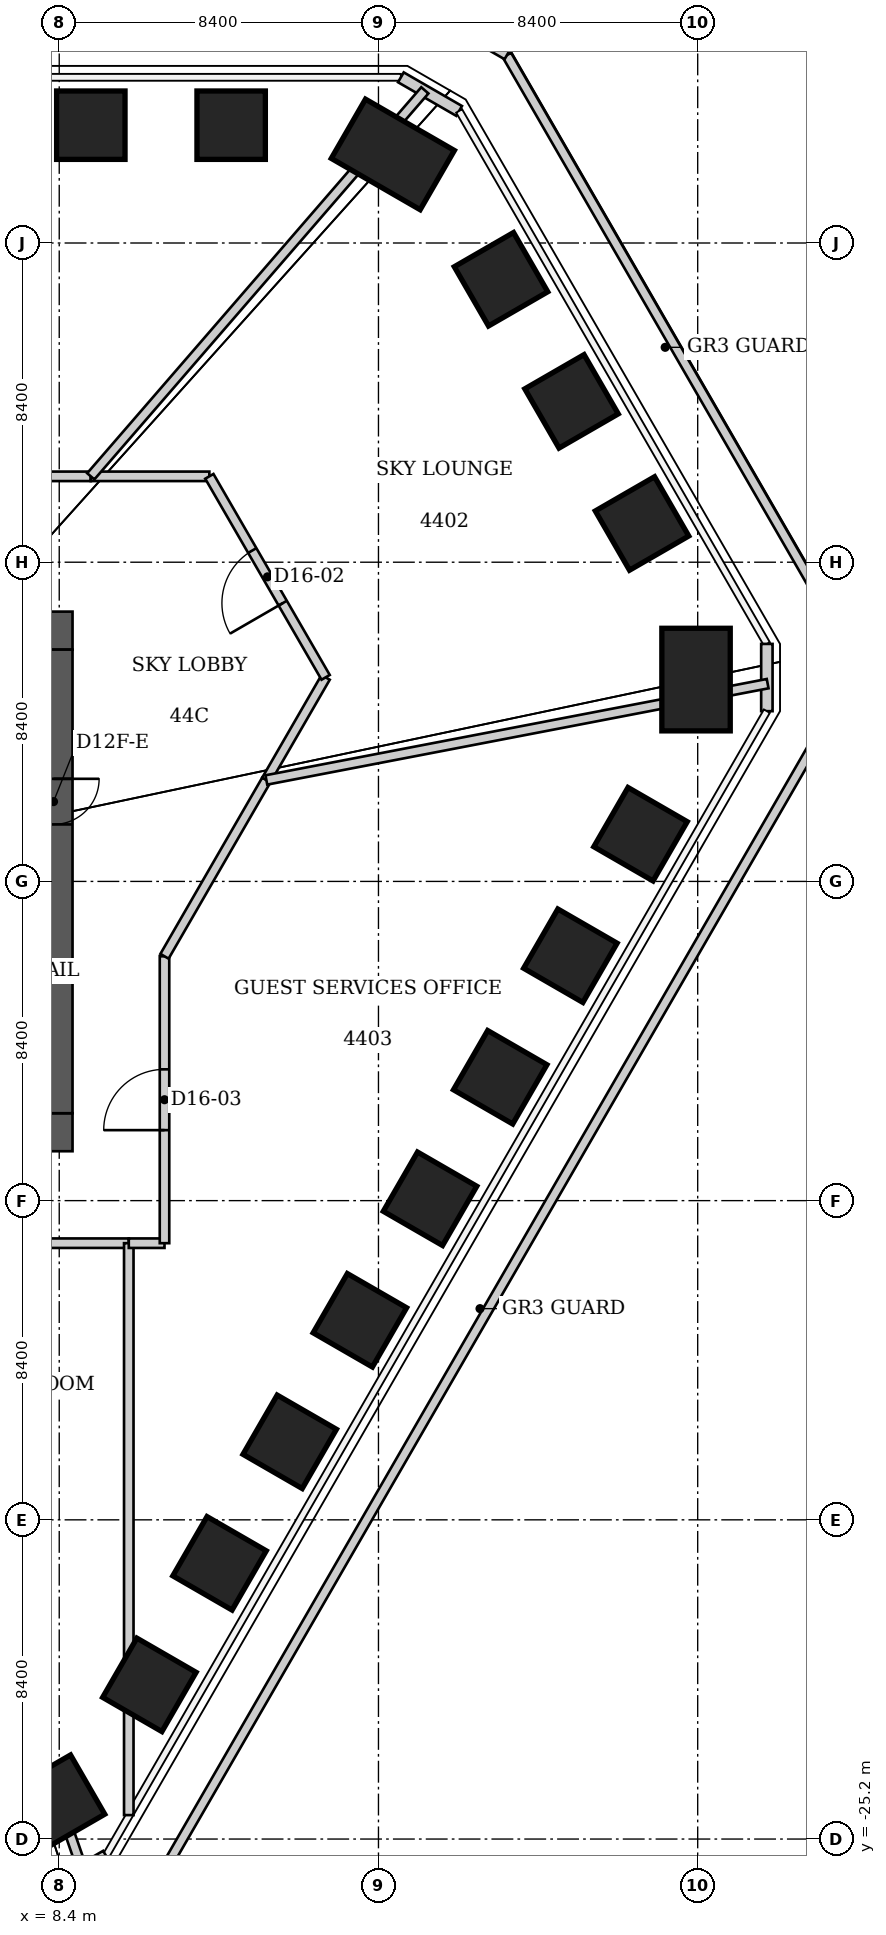
"""IFC4 building model, lengths in metres.
Left out: names, types, materials, properties, quantities, classifications, styles, units other than length and angle.
Written with IfcOpenShell. Run it as: python <this file> out.ifc"""

import sys

from ifc_helpers import new_model, si_unit, direction, frame, frame_2d, origin, origin_2d, place, context, subcontext, project, spatial, rectangle, extrude, clip, halfspace, element, fill, save


model = new_model("IFC4")
c1 = context("Model", 3, precision=1e-05, world=origin(), true_north=direction((0.0, 1.0)))
c2 = subcontext(c1, "Body", "Model", "MODEL_VIEW")
j1 = project(units=[si_unit("LENGTHUNIT", "METRE"), si_unit("PLANEANGLEUNIT", "RADIAN")], contexts=[c1])
p1 = place(None, origin())
s1 = spatial("IfcSite", under=j1, at=p1, CompositionType="ELEMENT")
p2 = place(p1, origin())
s2 = spatial("IfcBuilding", under=s1, at=p2, CompositionType="ELEMENT")
p3 = place(p2, frame((0.0, 0.0, 178.2)))
s3 = spatial("IfcBuildingStorey", under=s2, at=p3, CompositionType="ELEMENT", Elevation=178.2)
p4 = place(p3, frame((9.231, 19.9, -0.062), z_axis=(0.0, 0.0, 1.0), x_axis=(0.0, 1.0, 0.0)))
e1 = element("IfcColumn", 1, at=p4, inside=s3, PredefinedType="COLUMN", context=c2, shape_type="SweptSolid", body=[
    clip(extrude(rectangle(XDim=1.8, YDim=1.8, at=origin_2d()), origin(), (0.0, 0.0, 1.0), 5.062), halfspace(frame((0.0, 0.0, 0.062)), True)),
])
p5 = place(p3, frame((12.924, 19.9, -0.07), z_axis=(0.0, 0.0, 1.0), x_axis=(0.0, 1.0, 0.0)))
e2 = element("IfcColumn", 2, at=p5, inside=s3, PredefinedType="COLUMN", context=c2, shape_type="SweptSolid", body=[
    clip(extrude(rectangle(XDim=1.8, YDim=1.8, at=origin_2d()), origin(), (0.0, 0.0, 1.0), 5.07), halfspace(frame((0.0, 0.0, 0.07)), True)),
])
p6 = place(p3, frame((17.178, 19.131, -0.071), z_axis=(0.0, 0.0, 1.0), x_axis=(0.5, 0.866025403784, 0.0)))
e3 = element("IfcColumn", 3, at=p6, inside=s3, PredefinedType="COLUMN", context=c2, shape_type="SweptSolid", body=[
    clip(extrude(rectangle(XDim=1.8, YDim=2.7, at=origin_2d()), origin(), (0.0, 0.0, 1.0), 5.071), halfspace(frame((0.0, 0.0, 0.071)), True)),
])
p7 = place(p3, frame((20.025, 15.846, -0.061), z_axis=(0.0, 0.0, 1.0), x_axis=(0.866025403784, 0.5, 0.0)))
e4 = element("IfcColumn", 4, at=p7, inside=s3, PredefinedType="COLUMN", context=c2, shape_type="SweptSolid", body=[
    clip(extrude(rectangle(XDim=1.8, YDim=1.8, at=origin_2d()), origin(), (0.0, 0.0, 1.0), 5.061), halfspace(frame((0.0, 0.0, 0.061)), True)),
])
p8 = place(p3, frame((21.88, 12.633, -0.053), z_axis=(0.0, 0.0, 1.0), x_axis=(0.866025403784, 0.5, 0.0)))
e5 = element("IfcColumn", 5, at=p8, inside=s3, PredefinedType="COLUMN", context=c2, shape_type="SweptSolid", body=[
    clip(extrude(rectangle(XDim=1.8, YDim=1.8, at=origin_2d()), origin(), (0.0, 0.0, 1.0), 5.053), halfspace(frame((0.0, 0.0, 0.053)), True)),
])
p9 = place(p3, frame((23.735, 9.419, -0.061), z_axis=(0.0, 0.0, 1.0), x_axis=(0.866025403784, 0.5, 0.0)))
e6 = element("IfcColumn", 6, at=p9, inside=s3, PredefinedType="COLUMN", context=c2, shape_type="SweptSolid", body=[
    clip(extrude(rectangle(XDim=1.8, YDim=1.8, at=origin_2d()), origin(), (0.0, 0.0, 1.0), 5.061), halfspace(frame((0.0, 0.0, 0.061)), True)),
])
p10 = place(p3, frame((25.156, 5.311, -0.071), z_axis=(0.0, 0.0, 1.0), x_axis=(1.0, 0.0, 0.0)))
e7 = element("IfcColumn", 7, at=p10, inside=s3, PredefinedType="COLUMN", context=c2, shape_type="SweptSolid", body=[
    clip(extrude(rectangle(XDim=1.8, YDim=2.7, at=origin_2d()), origin(), (0.0, 0.0, 1.0), 5.071), halfspace(frame((0.0, 0.0, 0.071)), True)),
])
p11 = place(p3, frame((23.696, 1.242, -0.07), z_axis=(0.0, 0.0, 1.0), x_axis=(0.866025403784, -0.5, 0.0)))
e8 = element("IfcColumn", 8, at=p11, inside=s3, PredefinedType="COLUMN", context=c2, shape_type="SweptSolid", body=[
    clip(extrude(rectangle(XDim=1.8, YDim=1.8, at=origin_2d()), origin(), (0.0, 0.0, 1.0), 5.07), halfspace(frame((0.0, 0.0, 0.07)), True)),
])
p12 = place(p3, frame((21.85, -1.956, -0.062), z_axis=(0.0, 0.0, 1.0), x_axis=(0.866025403784, -0.5, 0.0)))
e9 = element("IfcColumn", 9, at=p12, inside=s3, PredefinedType="COLUMN", context=c2, shape_type="SweptSolid", body=[
    clip(extrude(rectangle(XDim=1.8, YDim=1.8, at=origin_2d()), origin(), (0.0, 0.0, 1.0), 5.062), halfspace(frame((0.0, 0.0, 0.062)), True)),
])
p13 = place(p3, frame((20.003, -5.153, -0.054), z_axis=(0.0, 0.0, 1.0), x_axis=(0.866025403784, -0.5, 0.0)))
e10 = element("IfcColumn", 10, at=p13, inside=s3, PredefinedType="COLUMN", context=c2, shape_type="SweptSolid", body=[
    clip(extrude(rectangle(XDim=1.8, YDim=1.8, at=origin_2d()), origin(), (0.0, 0.0, 1.0), 5.054), halfspace(frame((0.0, 0.0, 0.054)), True)),
])
for number, where, z_axis, x_axis in (
    (11, (18.157, -8.351, -0.046), (0.0, 0.0, 1.0), (0.866, -0.5, 0.0)),
    (12, (16.311, -11.549, -0.046), (0.0, 0.0, 1.0), (0.866, -0.5, 0.0)),
):
    element("IfcColumn", number, at=place(p3, frame(where, z_axis=z_axis, x_axis=x_axis)), inside=s3, PredefinedType="COLUMN", context=c2, shape_type="SweptSolid", body=[
        clip(extrude(rectangle(XDim=1.8, YDim=1.8, at=origin_2d()), origin(), (0.0, 0.0, 1.0), 5.046), halfspace(frame((0.0, 0.0, 0.046)), True)),
    ])
p14 = place(p3, frame((14.465, -14.747, -0.054), z_axis=(0.0, 0.0, 1.0), x_axis=(0.866025403784, -0.5, 0.0)))
e13 = element("IfcColumn", 13, at=p14, inside=s3, PredefinedType="COLUMN", context=c2, shape_type="SweptSolid", body=[
    clip(extrude(rectangle(XDim=1.8, YDim=1.8, at=origin_2d()), origin(), (0.0, 0.0, 1.0), 5.054), halfspace(frame((0.0, 0.0, 0.054)), True)),
])
p15 = place(p3, frame((12.618, -17.945, -0.062), z_axis=(0.0, 0.0, 1.0), x_axis=(0.866025403784, -0.5, 0.0)))
e14 = element("IfcColumn", 14, at=p15, inside=s3, PredefinedType="COLUMN", context=c2, shape_type="SweptSolid", body=[
    clip(extrude(rectangle(XDim=1.8, YDim=1.8, at=origin_2d()), origin(), (0.0, 0.0, 1.0), 5.062), halfspace(frame((0.0, 0.0, 0.062)), True)),
])
p16 = place(p3, frame((10.772, -21.142, -0.07), z_axis=(0.0, 0.0, 1.0), x_axis=(0.866025403784, -0.5, 0.0)))
e15 = element("IfcColumn", 15, at=p16, inside=s3, PredefinedType="COLUMN", context=c2, shape_type="SweptSolid", body=[
    clip(extrude(rectangle(XDim=1.8, YDim=1.8, at=origin_2d()), origin(), (0.0, 0.0, 1.0), 5.07), halfspace(frame((0.0, 0.0, 0.07)), True)),
])
p17 = place(p3, frame((7.979, -24.442, -0.071), z_axis=(0.0, 0.0, 1.0), x_axis=(0.5, -0.866025403784, 0.0)))
e16 = element("IfcColumn", 16, at=p17, inside=s3, PredefinedType="COLUMN", context=c2, shape_type="SweptSolid", body=[
    clip(extrude(rectangle(XDim=1.8, YDim=2.7, at=origin_2d()), origin(), (0.0, 0.0, 1.0), 5.071), halfspace(frame((0.0, 0.0, 0.071)), True)),
])
p18 = place(p3, frame((-8.75, 6.6, 0.0), z_axis=(0.0, 0.0, 1.0), x_axis=(1.0, 0.0, 0.0)))
e17 = element("IfcWall", 17, at=p18, inside=s3, PredefinedType="SHEAR", context=c2, shape_type="SweptSolid", body=[
    extrude(rectangle(XDim=17.5, YDim=1.0, at=frame_2d((8.75, 0.0))), origin(), (0.0, 0.0, 1.0), 5.0),
])
p19 = place(p18, frame((1.637, 0.0, 0.0)))
e18 = element("IfcOpeningElement", 18, at=p19, cuts=e17, PredefinedType="OPENING", context=c2, shape_type="SweptSolid", body=[
    extrude(rectangle(XDim=1.1, YDim=2.1, at=frame_2d((0.55, 1.05))), frame((0.0, 0.5, 0.0), z_axis=(0.0, -1.0, 0.0), x_axis=(1.0, 0.0, 0.0)), (0.0, 0.0, 1.0), 1.0),
])
p20 = place(p18, frame((4.262, 0.0, 0.0)))
e19 = element("IfcOpeningElement", 19, at=p20, cuts=e17, PredefinedType="OPENING", context=c2, shape_type="SweptSolid", body=[
    extrude(rectangle(XDim=1.1, YDim=2.1, at=frame_2d((0.55, 1.05))), frame((0.0, 0.5, 0.0), z_axis=(0.0, -1.0, 0.0), x_axis=(1.0, 0.0, 0.0)), (0.0, 0.0, 1.0), 1.0),
])
p21 = place(p18, frame((6.887, 0.0, 0.0)))
e20 = element("IfcOpeningElement", 20, at=p21, cuts=e17, PredefinedType="OPENING", context=c2, shape_type="SweptSolid", body=[
    extrude(rectangle(XDim=1.1, YDim=2.1, at=frame_2d((0.55, 1.05))), frame((0.0, 0.5, 0.0), z_axis=(0.0, -1.0, 0.0), x_axis=(1.0, 0.0, 0.0)), (0.0, 0.0, 1.0), 1.0),
])
p22 = place(p18, frame((9.512, 0.0, 0.0)))
e21 = element("IfcOpeningElement", 21, at=p22, cuts=e17, PredefinedType="OPENING", context=c2, shape_type="SweptSolid", body=[
    extrude(rectangle(XDim=1.1, YDim=2.1, at=frame_2d((0.55, 1.05))), frame((0.0, 0.5, 0.0), z_axis=(0.0, -1.0, 0.0), x_axis=(1.0, 0.0, 0.0)), (0.0, 0.0, 1.0), 1.0),
])
p23 = place(p18, frame((12.137, 0.0, 0.0)))
e22 = element("IfcOpeningElement", 22, at=p23, cuts=e17, PredefinedType="OPENING", context=c2, shape_type="SweptSolid", body=[
    extrude(rectangle(XDim=1.1, YDim=2.1, at=frame_2d((0.55, 1.05))), frame((0.0, 0.5, 0.0), z_axis=(0.0, -1.0, 0.0), x_axis=(1.0, 0.0, 0.0)), (0.0, 0.0, 1.0), 1.0),
])
p24 = place(p18, frame((14.762, 0.0, 0.0)))
e23 = element("IfcOpeningElement", 23, at=p24, cuts=e17, PredefinedType="OPENING", context=c2, shape_type="SweptSolid", body=[
    extrude(rectangle(XDim=1.1, YDim=2.1, at=frame_2d((0.55, 1.05))), frame((0.0, 0.5, 0.0), z_axis=(0.0, -1.0, 0.0), x_axis=(1.0, 0.0, 0.0)), (0.0, 0.0, 1.0), 1.0),
])
p25 = place(p3, frame((-8.75, -6.6, 0.0), z_axis=(0.0, 0.0, 1.0), x_axis=(1.0, 0.0, 0.0)))
e24 = element("IfcWall", 24, at=p25, inside=s3, PredefinedType="SHEAR", context=c2, shape_type="SweptSolid", body=[
    extrude(rectangle(XDim=17.5, YDim=1.0, at=frame_2d((8.75, 0.0))), origin(), (0.0, 0.0, 1.0), 5.0),
])
p26 = place(p3, frame((8.25, -6.1, 0.0), z_axis=(0.0, 0.0, 1.0), x_axis=(0.0, 1.0, 0.0)))
e25 = element("IfcWall", 25, at=p26, inside=s3, PredefinedType="SHEAR", context=c2, shape_type="SweptSolid", body=[
    extrude(rectangle(XDim=12.2, YDim=1.0, at=frame_2d((6.1, 0.0))), origin(), (0.0, 0.0, 1.0), 5.0),
])
p27 = place(p26, frame((7.6, 0.0, 0.0)))
e26 = element("IfcOpeningElement", 26, at=p27, cuts=e25, PredefinedType="OPENING", context=c2, shape_type="SweptSolid", body=[
    extrude(rectangle(XDim=1.2, YDim=2.2, at=frame_2d((0.6, 1.1))), frame((0.0, 0.5, 0.0), z_axis=(0.0, -1.0, 0.0), x_axis=(1.0, 0.0, 0.0)), (0.0, 0.0, 1.0), 1.0),
])
for number, where, z_axis, x_axis in (
    (27, (17.39, 21.16, 0.0), (0.0, 0.0, 1.0), (0.866, -0.5, 0.0)),
    (28, (27.02, 6.25, 0.0), (0.0, 0.0, 1.0), (0.0, -1.0, 0.0)),
    (29, (9.63, -25.64, 0.0), (0.0, 0.0, 1.0), (-0.866, -0.5, 0.0)),
):
    element("IfcWall", number, at=place(p3, frame(where, z_axis=z_axis, x_axis=x_axis)), inside=s3, PredefinedType="SOLIDWALL", context=c2, shape_type="SweptSolid", body=[
        extrude(rectangle(XDim=1.77, YDim=0.3, at=frame_2d((0.885, 0.0))), origin(), (0.0, 0.0, 1.0), 4.84),
    ])
p28 = place(p3, frame((10.36, -27.412, 0.0), z_axis=(0.0, 0.0, 1.0), x_axis=(0.500001430823, 0.866024577697, 0.0)))
e30 = element("IfcWall", 30, at=p28, inside=s3, PredefinedType="PARAPET", context=c2, shape_type="SweptSolid", body=[
    extrude(rectangle(XDim=37.119, YDim=0.25, at=frame_2d((18.56, 0.0))), origin(), (0.0, 0.0, 1.0), 1.1),
])
p29 = place(p3, frame((28.921, 6.605, 0.0), z_axis=(0.0, 0.0, 1.0), x_axis=(-0.500000912942, 0.866024876697, 0.0)))
e31 = element("IfcWall", 31, at=p29, inside=s3, PredefinedType="PARAPET", context=c2, shape_type="SweptSolid", body=[
    extrude(rectangle(XDim=17.481, YDim=0.25, at=frame_2d((8.74, 0.0))), origin(), (0.0, 0.0, 1.0), 1.1),
])
p30 = place(p3, frame((20.181, 21.744, 0.0), z_axis=(0.0, 0.0, 1.0), x_axis=(-0.86651128649, 0.499157480546, 0.0)))
e32 = element("IfcWall", 32, at=p30, inside=s3, PredefinedType="PARAPET", context=c2, shape_type="SweptSolid", body=[
    extrude(rectangle(XDim=1.871, YDim=0.25, at=frame_2d((0.936, 0.0))), origin(), (0.0, 0.0, 1.0), 1.1),
])
p31 = place(p3, frame((4.62, -13.33, 0.0), z_axis=(0.0, 0.0, 1.0), x_axis=(0.327133057776, -0.944978286793, 0.0)))
e33 = element("IfcWall", 33, at=p31, inside=s3, PredefinedType="PARTITIONING", context=c2, shape_type="SweptSolid", body=[
    extrude(rectangle(XDim=13.42, YDim=0.25, at=frame_2d((6.71, 0.0))), origin(), (0.0, 0.0, 1.0), 4.84),
])
p32 = place(p3, frame((6.81, -9.52, 0.0), z_axis=(0.0, 0.0, 1.0), x_axis=(1.0, 0.0, 0.0)))
e34 = element("IfcWall", 34, at=p32, inside=s3, PredefinedType="PARTITIONING", context=c2, shape_type="SweptSolid", body=[
    extrude(rectangle(XDim=3.42, YDim=0.25, at=frame_2d((1.71, 0.0))), origin(), (0.0, 0.0, 1.0), 4.84),
])
p33 = place(p3, frame((9.23, 10.66, 0.0), z_axis=(0.0, 0.0, 1.0), x_axis=(-1.0, 0.0, 0.0)))
e35 = element("IfcWall", 35, at=p33, inside=s3, PredefinedType="PARTITIONING", context=c2, shape_type="SweptSolid", body=[
    extrude(rectangle(XDim=18.46, YDim=0.25, at=frame_2d((9.23, 0.0))), origin(), (0.0, 0.0, 1.0), 4.84),
])
p34 = place(p33, frame((8.43, 0.0, 0.0)))
e36 = element("IfcOpeningElement", 36, at=p34, cuts=e35, PredefinedType="OPENING", context=c2, shape_type="SweptSolid", body=[
    extrude(rectangle(XDim=1.6, YDim=2.4, at=frame_2d((0.8, 1.2))), frame((0.0, 0.125, 0.0), z_axis=(0.0, -1.0, 0.0), x_axis=(1.0, 0.0, 0.0)), (0.0, 0.0, 1.0), 0.25),
])
p35 = place(p3, frame((10.23, -24.57, 0.0), z_axis=(0.0, 0.0, 1.0), x_axis=(0.0, 1.0, 0.0)))
e37 = element("IfcWall", 37, at=p35, inside=s3, PredefinedType="PARTITIONING", context=c2, shape_type="SweptSolid", body=[
    extrude(rectangle(XDim=15.05, YDim=0.25, at=frame_2d((7.525, 0.0))), origin(), (0.0, 0.0, 1.0), 4.84),
])
p36 = place(p3, frame((10.23, -9.52, 0.0), z_axis=(0.0, 0.0, 1.0), x_axis=(1.0, 0.0, 0.0)))
e38 = element("IfcWall", 38, at=p36, inside=s3, PredefinedType="PARTITIONING", context=c2, shape_type="SweptSolid", body=[
    extrude(rectangle(XDim=0.94, YDim=0.25, at=frame_2d((0.47, 0.0))), origin(), (0.0, 0.0, 1.0), 4.84),
])
p37 = place(p3, frame((11.17, -9.52, 0.0), z_axis=(0.0, 0.0, 1.0), x_axis=(0.0, 1.0, 0.0)))
e39 = element("IfcWall", 39, at=p37, inside=s3, PredefinedType="PARTITIONING", context=c2, shape_type="SweptSolid", body=[
    extrude(rectangle(XDim=7.55, YDim=0.25, at=frame_2d((3.775, 0.0))), origin(), (0.0, 0.0, 1.0), 4.84),
])
p38 = place(p37, frame((2.975, 0.0, 0.0)))
e40 = element("IfcOpeningElement", 40, at=p38, cuts=e39, PredefinedType="OPENING", context=c2, shape_type="SweptSolid", body=[
    extrude(rectangle(XDim=1.6, YDim=2.4, at=frame_2d((0.8, 1.2))), frame((0.0, 0.125, 0.0), z_axis=(0.0, -1.0, 0.0), x_axis=(1.0, 0.0, 0.0)), (0.0, 0.0, 1.0), 0.25),
])
p39 = place(p3, frame((11.17, -1.97, 0.0), z_axis=(0.0, 0.0, 1.0), x_axis=(0.500186503593, 0.865917699105, 0.0)))
e41 = element("IfcWall", 41, at=p39, inside=s3, PredefinedType="PARTITIONING", context=c2, shape_type="SweptSolid", body=[
    extrude(rectangle(XDim=5.358, YDim=0.25, at=frame_2d((2.679, 0.0))), origin(), (0.0, 0.0, 1.0), 4.84),
])
p40 = place(p3, frame((12.35, 10.66, 0.0), z_axis=(0.0, 0.0, 1.0), x_axis=(-1.0, 0.0, 0.0)))
e42 = element("IfcWall", 42, at=p40, inside=s3, PredefinedType="PARTITIONING", context=c2, shape_type="SweptSolid", body=[
    extrude(rectangle(XDim=3.12, YDim=0.25, at=frame_2d((1.56, 0.0))), origin(), (0.0, 0.0, 1.0), 4.84),
])
p41 = place(p3, frame((13.85, 2.67, 0.0), z_axis=(0.0, 0.0, 1.0), x_axis=(0.50020585531, 0.86590652054, 0.0)))
e43 = element("IfcWall", 43, at=p41, inside=s3, PredefinedType="PARTITIONING", context=c2, shape_type="SweptSolid", body=[
    extrude(rectangle(XDim=3.118, YDim=0.25, at=frame_2d((1.559, 0.0))), origin(), (0.0, 0.0, 1.0), 4.84),
])
p42 = place(p3, frame((15.41, 5.37, 0.0), z_axis=(0.0, 0.0, 1.0), x_axis=(-0.500705519489, 0.865617688563, 0.0)))
e44 = element("IfcWall", 44, at=p42, inside=s3, PredefinedType="PARTITIONING", context=c2, shape_type="SweptSolid", body=[
    extrude(rectangle(XDim=6.111, YDim=0.25, at=frame_2d((3.056, 0.0))), origin(), (0.0, 0.0, 1.0), 4.84),
])
p43 = place(p42, frame((2.256, 0.0, 0.0)))
e45 = element("IfcOpeningElement", 45, at=p43, cuts=e44, PredefinedType="OPENING", context=c2, shape_type="SweptSolid", body=[
    extrude(rectangle(XDim=1.6, YDim=2.4, at=frame_2d((0.8, 1.2))), frame((0.0, 0.125, 0.0), z_axis=(0.0, -1.0, 0.0), x_axis=(1.0, 0.0, 0.0)), (0.0, 0.0, 1.0), 0.25),
])
p44 = place(p3, frame((18.02, 20.817, 0.0), z_axis=(0.0, 0.0, 1.0), x_axis=(-0.654383739154, -0.756162629288, 0.0)))
e46 = element("IfcWall", 46, at=p44, inside=s3, PredefinedType="PARTITIONING", context=c2, shape_type="SweptSolid", body=[
    extrude(rectangle(XDim=13.433, YDim=0.25, at=frame_2d((6.716, 0.0))), origin(), (0.0, 0.0, 1.0), 4.84),
])
p45 = place(p3, frame((27.041, 5.204, 0.0), z_axis=(0.0, 0.0, 1.0), x_axis=(-0.982036771594, -0.188689637335, 0.0)))
e47 = element("IfcWall", 47, at=p45, inside=s3, PredefinedType="PARTITIONING", context=c2, shape_type="SweptSolid", body=[
    extrude(rectangle(XDim=13.432, YDim=0.25, at=frame_2d((6.716, 0.0))), origin(), (0.0, 0.0, 1.0), 4.84),
])
p46 = place(p43, origin())
e48 = element("IfcDoor", 48, at=p46, inside=s3, OperationType="DOUBLE_DOOR_SINGLE_SWING", PredefinedType="DOOR", context=c2, shape_type="SweptSolid", body=[
    extrude(rectangle(XDim=1.6, YDim=2.4, at=frame_2d((0.8, 1.2))), frame((0.0, 0.025, 0.0), z_axis=(0.0, -1.0, 0.0), x_axis=(1.0, 0.0, 0.0)), (0.0, 0.0, 1.0), 0.05),
])
fill(e45, e48)
p47 = place(p38, origin())
e49 = element("IfcDoor", 49, at=p47, inside=s3, OperationType="DOUBLE_DOOR_SINGLE_SWING", PredefinedType="DOOR", context=c2, shape_type="SweptSolid", body=[
    extrude(rectangle(XDim=1.6, YDim=2.4, at=frame_2d((0.8, 1.2))), frame((0.0, 0.025, 0.0), z_axis=(0.0, -1.0, 0.0), x_axis=(1.0, 0.0, 0.0)), (0.0, 0.0, 1.0), 0.05),
])
fill(e40, e49)
p48 = place(p27, origin())
e50 = element("IfcDoor", 50, at=p48, inside=s3, OperationType="SINGLE_SWING_RIGHT", PredefinedType="DOOR", context=c2, shape_type="SweptSolid", body=[
    extrude(rectangle(XDim=1.2, YDim=2.2, at=frame_2d((0.6, 1.1))), frame((0.0, 0.025, 0.0), z_axis=(0.0, -1.0, 0.0), x_axis=(1.0, 0.0, 0.0)), (0.0, 0.0, 1.0), 0.05),
])
fill(e26, e50)
save(model, sys.argv[1])
